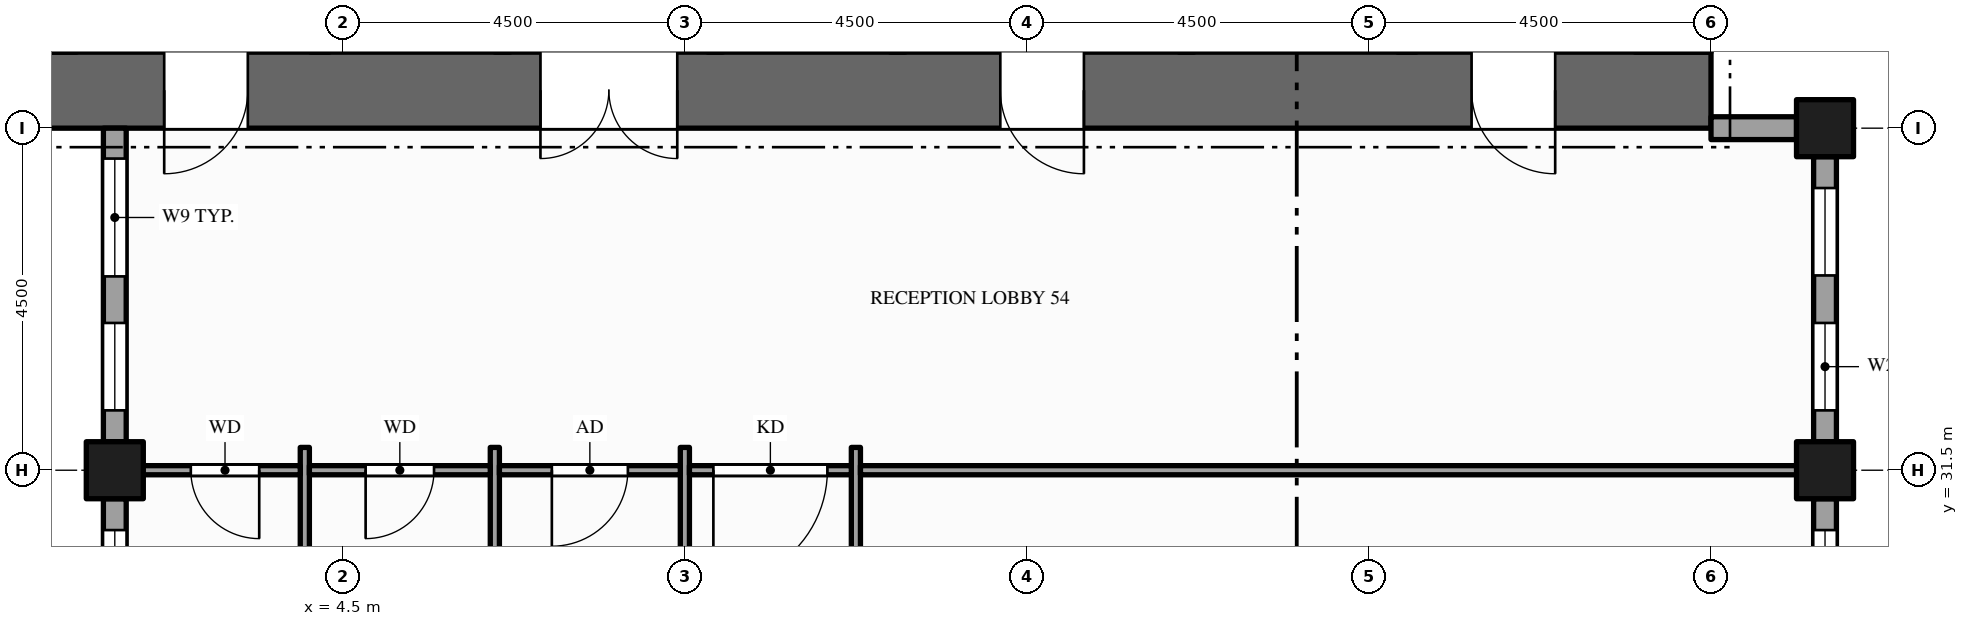
"""IFC4 building model, lengths in metres.
Left out: names, types, materials, properties, quantities, classifications, styles, units other than length and angle.
Written with IfcOpenShell. Run it as: python <this file> out.ifc"""

import sys

from ifc_helpers import new_model, si_unit, direction, frame, frame_2d, origin, origin_2d, place, context, subcontext, project, spatial, rectangle, hollow_rectangle, extrude, element, fill, save


model = new_model("IFC4")
c1 = context("Model", 3, precision=1e-05, world=origin(), true_north=direction((0.0, 1.0)))
c2 = subcontext(c1, "Body", "Model", "MODEL_VIEW")
j1 = project(units=[si_unit("LENGTHUNIT", "METRE"), si_unit("PLANEANGLEUNIT", "RADIAN")], contexts=[c1])
p1 = place(None, origin())
s1 = spatial("IfcSite", under=j1, at=p1, CompositionType="ELEMENT")
p2 = place(p1, origin())
s2 = spatial("IfcBuilding", under=s1, at=p2, CompositionType="ELEMENT")
p3 = place(p2, frame((0.0, 0.0, 223.0)))
s3 = spatial("IfcBuildingStorey", under=s2, at=p3, CompositionType="ELEMENT", Elevation=223.0)
p4 = place(p3, frame((0.0, 36.5, -0.15), z_axis=(0.0, 0.0, 1.0), x_axis=(1.0, 0.0, 0.0)))
e1 = element("IfcWall", 1, at=p4, inside=s3, PredefinedType="SHEAR", context=c2, shape_type="SweptSolid", body=[
    extrude(rectangle(XDim=22.5, YDim=1.0, at=frame_2d((11.25, 0.0))), origin(), (0.0, 0.0, 1.0), 4.0),
])
p5 = place(p4, frame((7.1, 0.0, 0.15)))
e2 = element("IfcOpeningElement", 2, at=p5, cuts=e1, PredefinedType="OPENING", context=c2, shape_type="SweptSolid", body=[
    extrude(rectangle(XDim=1.8, YDim=2.1, at=frame_2d((0.9, 1.05))), frame((0.0, 0.51, 0.0), z_axis=(0.0, -1.0, 0.0), x_axis=(1.0, 0.0, 0.0)), (0.0, 0.0, 1.0), 1.02),
])
p6 = place(p4, frame((13.15, 0.0, 0.15)))
e3 = element("IfcOpeningElement", 3, at=p6, cuts=e1, PredefinedType="OPENING", context=c2, shape_type="SweptSolid", body=[
    extrude(rectangle(XDim=1.1, YDim=2.1, at=frame_2d((0.55, 1.05))), frame((0.0, 0.51, 0.0), z_axis=(0.0, -1.0, 0.0), x_axis=(1.0, 0.0, 0.0)), (0.0, 0.0, 1.0), 1.02),
])
p7 = place(p4, frame((2.15, 0.0, 0.15)))
e4 = element("IfcOpeningElement", 4, at=p7, cuts=e1, PredefinedType="OPENING", context=c2, shape_type="SweptSolid", body=[
    extrude(rectangle(XDim=1.1, YDim=2.1, at=frame_2d((0.55, 1.05))), frame((0.0, 0.51, 0.0), z_axis=(0.0, -1.0, 0.0), x_axis=(1.0, 0.0, 0.0)), (0.0, 0.0, 1.0), 1.02),
])
p8 = place(p4, frame((19.35, 0.0, 0.15)))
e5 = element("IfcOpeningElement", 5, at=p8, cuts=e1, PredefinedType="OPENING", context=c2, shape_type="SweptSolid", body=[
    extrude(rectangle(XDim=1.1, YDim=2.1, at=frame_2d((0.55, 1.05))), frame((0.0, 0.51, 0.0), z_axis=(0.0, -1.0, 0.0), x_axis=(1.0, 0.0, 0.0)), (0.0, 0.0, 1.0), 1.02),
])
for number, where, z_axis, x_axis in (
    (6, (1.5, 31.5, -0.15), (0.0, 0.0, 1.0), (1.0, 0.0, 0.0)),
    (7, (24.0, 31.5, -0.15), (0.0, 0.0, 1.0), (1.0, 0.0, 0.0)),
    (8, (24.0, 36.0, -0.15), (0.0, 0.0, 1.0), (1.0, 0.0, 0.0)),
):
    element("IfcColumn", number, at=place(p3, frame(where, z_axis=z_axis, x_axis=x_axis)), inside=s3, PredefinedType="COLUMN", context=c2, shape_type="SweptSolid", body=[
        extrude(hollow_rectangle(XDim=0.75, YDim=0.75, WallThickness=0.036, at=origin_2d()), origin(), (0.0, 0.0, 1.0), 4.0),
    ])
p9 = place(p3, frame((24.0, 25.875, 0.0), z_axis=(0.0, 0.0, 1.0), x_axis=(0.0, 1.0, 0.0)))
e9 = element("IfcWall", 9, at=p9, inside=s3, PredefinedType="STANDARD", context=c2, shape_type="SweptSolid", body=[
    extrude(rectangle(XDim=5.25, YDim=0.3, at=frame_2d((2.625, 0.0))), origin(), (0.0, 0.0, 1.0), 3.157),
])
p10 = place(p9, frame((1.425, 0.0, 0.9)))
e10 = element("IfcOpeningElement", 10, at=p10, cuts=e9, PredefinedType="OPENING", context=c2, shape_type="SweptSolid", body=[
    extrude(rectangle(XDim=1.65, YDim=2.0, at=frame_2d((0.825, 1.0))), frame((0.0, 0.16, 0.0), z_axis=(0.0, -1.0, 0.0), x_axis=(1.0, 0.0, 0.0)), (0.0, 0.0, 1.0), 0.32),
])
p11 = place(p9, frame((3.688, 0.0, 0.9)))
e11 = element("IfcOpeningElement", 11, at=p11, cuts=e9, PredefinedType="OPENING", context=c2, shape_type="SweptSolid", body=[
    extrude(rectangle(XDim=1.15, YDim=2.0, at=frame_2d((0.575, 1.0))), frame((0.0, 0.16, 0.0), z_axis=(0.0, -1.0, 0.0), x_axis=(1.0, 0.0, 0.0)), (0.0, 0.0, 1.0), 0.32),
])
p12 = place(p3, frame((24.0, 31.875, 0.0), z_axis=(0.0, 0.0, 1.0), x_axis=(0.0, 1.0, 0.0)))
e12 = element("IfcWall", 12, at=p12, inside=s3, PredefinedType="STANDARD", context=c2, shape_type="SweptSolid", body=[
    extrude(rectangle(XDim=3.75, YDim=0.3, at=frame_2d((1.875, 0.0))), origin(), (0.0, 0.0, 1.0), 3.157),
])
p13 = place(p12, frame((0.413, 0.0, 0.9)))
e13 = element("IfcOpeningElement", 13, at=p13, cuts=e12, PredefinedType="OPENING", context=c2, shape_type="SweptSolid", body=[
    extrude(rectangle(XDim=1.15, YDim=2.0, at=frame_2d((0.575, 1.0))), frame((0.0, 0.16, 0.0), z_axis=(0.0, -1.0, 0.0), x_axis=(1.0, 0.0, 0.0)), (0.0, 0.0, 1.0), 0.32),
])
p14 = place(p12, frame((2.188, 0.0, 0.9)))
e14 = element("IfcOpeningElement", 14, at=p14, cuts=e12, PredefinedType="OPENING", context=c2, shape_type="SweptSolid", body=[
    extrude(rectangle(XDim=1.15, YDim=2.0, at=frame_2d((0.575, 1.0))), frame((0.0, 0.16, 0.0), z_axis=(0.0, -1.0, 0.0), x_axis=(1.0, 0.0, 0.0)), (0.0, 0.0, 1.0), 0.32),
])
p15 = place(p3, frame((23.625, 36.0, 0.0), z_axis=(0.0, 0.0, 1.0), x_axis=(-1.0, 0.0, 0.0)))
e15 = element("IfcWall", 15, at=p15, inside=s3, PredefinedType="STANDARD", context=c2, shape_type="SweptSolid", body=[
    extrude(rectangle(XDim=1.125, YDim=0.3, at=frame_2d((0.562, 0.0))), origin(), (0.0, 0.0, 1.0), 2.87),
])
p16 = place(p3, frame((1.5, 36.0, 0.0), z_axis=(0.0, 0.0, 1.0), x_axis=(0.0, -1.0, 0.0)))
e16 = element("IfcWall", 16, at=p16, inside=s3, PredefinedType="STANDARD", context=c2, shape_type="SweptSolid", body=[
    extrude(rectangle(XDim=4.125, YDim=0.3, at=frame_2d((2.062, 0.0))), origin(), (0.0, 0.0, 1.0), 3.157),
])
p17 = place(p16, frame((0.4, 0.0, 0.9)))
e17 = element("IfcOpeningElement", 17, at=p17, cuts=e16, PredefinedType="OPENING", context=c2, shape_type="SweptSolid", body=[
    extrude(rectangle(XDim=1.55, YDim=2.0, at=frame_2d((0.775, 1.0))), frame((0.0, 0.16, 0.0), z_axis=(0.0, -1.0, 0.0), x_axis=(1.0, 0.0, 0.0)), (0.0, 0.0, 1.0), 0.32),
])
p18 = place(p16, frame((2.562, 0.0, 0.9)))
e18 = element("IfcOpeningElement", 18, at=p18, cuts=e16, PredefinedType="OPENING", context=c2, shape_type="SweptSolid", body=[
    extrude(rectangle(XDim=1.15, YDim=2.0, at=frame_2d((0.575, 1.0))), frame((0.0, 0.16, 0.0), z_axis=(0.0, -1.0, 0.0), x_axis=(1.0, 0.0, 0.0)), (0.0, 0.0, 1.0), 0.32),
])
p19 = place(p3, frame((1.5, 31.125, 0.0), z_axis=(0.0, 0.0, 1.0), x_axis=(0.0, -1.0, 0.0)))
e19 = element("IfcWall", 19, at=p19, inside=s3, PredefinedType="STANDARD", context=c2, shape_type="SweptSolid", body=[
    extrude(rectangle(XDim=3.75, YDim=0.3, at=frame_2d((1.875, 0.0))), origin(), (0.0, 0.0, 1.0), 3.157),
])
p20 = place(p19, frame((0.413, 0.0, 0.9)))
e20 = element("IfcOpeningElement", 20, at=p20, cuts=e19, PredefinedType="OPENING", context=c2, shape_type="SweptSolid", body=[
    extrude(rectangle(XDim=1.15, YDim=2.0, at=frame_2d((0.575, 1.0))), frame((0.0, 0.16, 0.0), z_axis=(0.0, -1.0, 0.0), x_axis=(1.0, 0.0, 0.0)), (0.0, 0.0, 1.0), 0.32),
])
p21 = place(p19, frame((2.188, 0.0, 0.9)))
e21 = element("IfcOpeningElement", 21, at=p21, cuts=e19, PredefinedType="OPENING", context=c2, shape_type="SweptSolid", body=[
    extrude(rectangle(XDim=1.15, YDim=2.0, at=frame_2d((0.575, 1.0))), frame((0.0, 0.16, 0.0), z_axis=(0.0, -1.0, 0.0), x_axis=(1.0, 0.0, 0.0)), (0.0, 0.0, 1.0), 0.32),
])
for number, where, z_axis, x_axis in (
    (22, (4.0, 26.7, 0.0), (0.0, 0.0, 1.0), (0.0, 1.0, 0.0)),
    (23, (6.5, 26.7, 0.0), (0.0, 0.0, 1.0), (0.0, 1.0, 0.0)),
):
    element("IfcWall", number, at=place(p3, frame(where, z_axis=z_axis, x_axis=x_axis)), inside=s3, PredefinedType="PARTITIONING", context=c2, shape_type="SweptSolid", body=[
        extrude(rectangle(XDim=5.1, YDim=0.12, at=frame_2d((2.55, 0.0))), origin(), (0.0, 0.0, 1.0), 3.85),
    ])
p22 = place(p3, frame((9.0, 8.7, 0.0), z_axis=(0.0, 0.0, 1.0), x_axis=(0.0, 1.0, 0.0)))
e24 = element("IfcWall", 24, at=p22, inside=s3, PredefinedType="PARTITIONING", context=c2, shape_type="SweptSolid", body=[
    extrude(rectangle(XDim=23.1, YDim=0.12, at=frame_2d((11.55, 0.0))), origin(), (0.0, 0.0, 1.0), 2.6),
])
p23 = place(p22, frame((2.05, 0.0, 0.0)))
e25 = element("IfcOpeningElement", 25, at=p23, cuts=e24, PredefinedType="OPENING", context=c2, shape_type="SweptSolid", body=[
    extrude(rectangle(XDim=1.0, YDim=2.1, at=frame_2d((0.5, 1.05))), frame((0.0, 0.07, 0.0), z_axis=(0.0, -1.0, 0.0), x_axis=(1.0, 0.0, 0.0)), (0.0, 0.0, 1.0), 0.14),
])
p24 = place(p22, frame((7.675, 0.0, 0.0)))
e26 = element("IfcOpeningElement", 26, at=p24, cuts=e24, PredefinedType="OPENING", context=c2, shape_type="SweptSolid", body=[
    extrude(rectangle(XDim=1.0, YDim=2.1, at=frame_2d((0.5, 1.05))), frame((0.0, 0.07, 0.0), z_axis=(0.0, -1.0, 0.0), x_axis=(1.0, 0.0, 0.0)), (0.0, 0.0, 1.0), 0.14),
])
p25 = place(p22, frame((14.455, 0.0, 0.0)))
e27 = element("IfcOpeningElement", 27, at=p25, cuts=e24, PredefinedType="OPENING", context=c2, shape_type="SweptSolid", body=[
    extrude(rectangle(XDim=1.0, YDim=2.1, at=frame_2d((0.5, 1.05))), frame((0.0, 0.07, 0.0), z_axis=(0.0, -1.0, 0.0), x_axis=(1.0, 0.0, 0.0)), (0.0, 0.0, 1.0), 0.14),
])
p26 = place(p3, frame((11.25, 8.7, 0.0), z_axis=(0.0, 0.0, 1.0), x_axis=(0.0, 1.0, 0.0)))
e28 = element("IfcWall", 28, at=p26, inside=s3, PredefinedType="PARTITIONING", context=c2, shape_type="SweptSolid", body=[
    extrude(rectangle(XDim=23.1, YDim=0.12, at=frame_2d((11.55, 0.0))), origin(), (0.0, 0.0, 1.0), 2.6),
])
p27 = place(p26, frame((18.825, 0.0, 0.0)))
e29 = element("IfcOpeningElement", 29, at=p27, cuts=e28, PredefinedType="OPENING", context=c2, shape_type="SweptSolid", body=[
    extrude(rectangle(XDim=1.2, YDim=2.1, at=frame_2d((0.6, 1.05))), frame((0.0, 0.07, 0.0), z_axis=(0.0, -1.0, 0.0), x_axis=(1.0, 0.0, 0.0)), (0.0, 0.0, 1.0), 0.14),
])
p28 = place(p26, frame((4.2, 0.0, 0.0)))
e30 = element("IfcOpeningElement", 30, at=p28, cuts=e28, PredefinedType="OPENING", context=c2, shape_type="SweptSolid", body=[
    extrude(rectangle(XDim=1.2, YDim=2.1, at=frame_2d((0.6, 1.05))), frame((0.0, 0.07, 0.0), z_axis=(0.0, -1.0, 0.0), x_axis=(1.0, 0.0, 0.0)), (0.0, 0.0, 1.0), 0.14),
])
p29 = place(p3, frame((1.65, 31.5, 0.0), z_axis=(0.0, 0.0, 1.0), x_axis=(1.0, 0.0, 0.0)))
e31 = element("IfcWall", 31, at=p29, inside=s3, PredefinedType="PARTITIONING", context=c2, shape_type="SweptSolid", body=[
    extrude(rectangle(XDim=2.29, YDim=0.12, at=frame_2d((1.145, 0.0))), origin(), (0.0, 0.0, 1.0), 2.87),
])
p30 = place(p29, frame((0.85, 0.0, 0.0)))
e32 = element("IfcOpeningElement", 32, at=p30, cuts=e31, PredefinedType="OPENING", context=c2, shape_type="SweptSolid", body=[
    extrude(rectangle(XDim=0.9, YDim=2.1, at=frame_2d((0.45, 1.05))), frame((0.0, 0.07, 0.0), z_axis=(0.0, -1.0, 0.0), x_axis=(1.0, 0.0, 0.0)), (0.0, 0.0, 1.0), 0.14),
])
p31 = place(p3, frame((4.06, 31.5, 0.0), z_axis=(0.0, 0.0, 1.0), x_axis=(1.0, 0.0, 0.0)))
e33 = element("IfcWall", 33, at=p31, inside=s3, PredefinedType="PARTITIONING", context=c2, shape_type="SweptSolid", body=[
    extrude(rectangle(XDim=2.38, YDim=0.12, at=frame_2d((1.19, 0.0))), origin(), (0.0, 0.0, 1.0), 2.87),
])
p32 = place(p31, frame((0.74, 0.0, 0.0)))
e34 = element("IfcOpeningElement", 34, at=p32, cuts=e33, PredefinedType="OPENING", context=c2, shape_type="SweptSolid", body=[
    extrude(rectangle(XDim=0.9, YDim=2.1, at=frame_2d((0.45, 1.05))), frame((0.0, 0.07, 0.0), z_axis=(0.0, -1.0, 0.0), x_axis=(1.0, 0.0, 0.0)), (0.0, 0.0, 1.0), 0.14),
])
p33 = place(p3, frame((6.56, 31.5, 0.0), z_axis=(0.0, 0.0, 1.0), x_axis=(1.0, 0.0, 0.0)))
e35 = element("IfcWall", 35, at=p33, inside=s3, PredefinedType="PARTITIONING", context=c2, shape_type="SweptSolid", body=[
    extrude(rectangle(XDim=2.38, YDim=0.12, at=frame_2d((1.19, 0.0))), origin(), (0.0, 0.0, 1.0), 2.87),
])
p34 = place(p33, frame((0.69, 0.0, 0.0)))
e36 = element("IfcOpeningElement", 36, at=p34, cuts=e35, PredefinedType="OPENING", context=c2, shape_type="SweptSolid", body=[
    extrude(rectangle(XDim=1.0, YDim=2.1, at=frame_2d((0.5, 1.05))), frame((0.0, 0.07, 0.0), z_axis=(0.0, -1.0, 0.0), x_axis=(1.0, 0.0, 0.0)), (0.0, 0.0, 1.0), 0.14),
])
p35 = place(p3, frame((9.06, 31.5, 0.0), z_axis=(0.0, 0.0, 1.0), x_axis=(1.0, 0.0, 0.0)))
e37 = element("IfcWall", 37, at=p35, inside=s3, PredefinedType="PARTITIONING", context=c2, shape_type="SweptSolid", body=[
    extrude(rectangle(XDim=2.13, YDim=0.12, at=frame_2d((1.065, 0.0))), origin(), (0.0, 0.0, 1.0), 2.87),
])
p36 = place(p35, frame((0.315, 0.0, 0.0)))
e38 = element("IfcOpeningElement", 38, at=p36, cuts=e37, PredefinedType="OPENING", context=c2, shape_type="SweptSolid", body=[
    extrude(rectangle(XDim=1.5, YDim=2.1, at=frame_2d((0.75, 1.05))), frame((0.0, 0.07, 0.0), z_axis=(0.0, -1.0, 0.0), x_axis=(1.0, 0.0, 0.0)), (0.0, 0.0, 1.0), 0.14),
])
p37 = place(p3, frame((11.31, 31.5, 0.0), z_axis=(0.0, 0.0, 1.0), x_axis=(1.0, 0.0, 0.0)))
e39 = element("IfcWall", 39, at=p37, inside=s3, PredefinedType="PARTITIONING", context=c2, shape_type="SweptSolid", body=[
    extrude(rectangle(XDim=12.54, YDim=0.12, at=frame_2d((6.27, 0.0))), origin(), (0.0, 0.0, 1.0), 2.87),
])
p38 = place(p11, origin())
e40 = element("IfcWindow", 40, at=p38, inside=s3, PartitioningType="SINGLE_PANEL", PredefinedType="WINDOW", context=c2, shape_type="SweptSolid", body=[
    extrude(rectangle(XDim=1.15, YDim=2.0, at=frame_2d((0.575, 1.0))), frame((0.0, 0.03, 0.0), z_axis=(0.0, -1.0, 0.0), x_axis=(1.0, 0.0, 0.0)), (0.0, 0.0, 1.0), 0.06),
])
fill(e11, e40)
p39 = place(p13, origin())
e41 = element("IfcWindow", 41, at=p39, inside=s3, PartitioningType="SINGLE_PANEL", PredefinedType="WINDOW", context=c2, shape_type="SweptSolid", body=[
    extrude(rectangle(XDim=1.15, YDim=2.0, at=frame_2d((0.575, 1.0))), frame((0.0, 0.03, 0.0), z_axis=(0.0, -1.0, 0.0), x_axis=(1.0, 0.0, 0.0)), (0.0, 0.0, 1.0), 0.06),
])
fill(e13, e41)
p40 = place(p14, origin())
e42 = element("IfcWindow", 42, at=p40, inside=s3, PartitioningType="SINGLE_PANEL", PredefinedType="WINDOW", context=c2, shape_type="SweptSolid", body=[
    extrude(rectangle(XDim=1.15, YDim=2.0, at=frame_2d((0.575, 1.0))), frame((0.0, 0.03, 0.0), z_axis=(0.0, -1.0, 0.0), x_axis=(1.0, 0.0, 0.0)), (0.0, 0.0, 1.0), 0.06),
])
fill(e14, e42)
p41 = place(p17, origin())
e43 = element("IfcWindow", 43, at=p41, inside=s3, PartitioningType="SINGLE_PANEL", PredefinedType="WINDOW", context=c2, shape_type="SweptSolid", body=[
    extrude(rectangle(XDim=1.55, YDim=2.0, at=frame_2d((0.775, 1.0))), frame((0.0, 0.03, 0.0), z_axis=(0.0, -1.0, 0.0), x_axis=(1.0, 0.0, 0.0)), (0.0, 0.0, 1.0), 0.06),
])
fill(e17, e43)
p42 = place(p18, origin())
e44 = element("IfcWindow", 44, at=p42, inside=s3, PartitioningType="SINGLE_PANEL", PredefinedType="WINDOW", context=c2, shape_type="SweptSolid", body=[
    extrude(rectangle(XDim=1.15, YDim=2.0, at=frame_2d((0.575, 1.0))), frame((0.0, 0.03, 0.0), z_axis=(0.0, -1.0, 0.0), x_axis=(1.0, 0.0, 0.0)), (0.0, 0.0, 1.0), 0.06),
])
fill(e18, e44)
p43 = place(p20, origin())
e45 = element("IfcWindow", 45, at=p43, inside=s3, PartitioningType="SINGLE_PANEL", PredefinedType="WINDOW", context=c2, shape_type="SweptSolid", body=[
    extrude(rectangle(XDim=1.15, YDim=2.0, at=frame_2d((0.575, 1.0))), frame((0.0, 0.03, 0.0), z_axis=(0.0, -1.0, 0.0), x_axis=(1.0, 0.0, 0.0)), (0.0, 0.0, 1.0), 0.06),
])
fill(e20, e45)
p44 = place(p5, origin())
e46 = element("IfcDoor", 46, at=p44, inside=s3, OperationType="DOUBLE_DOOR_SINGLE_SWING", PredefinedType="DOOR", context=c2, shape_type="SweptSolid", body=[
    extrude(rectangle(XDim=1.8, YDim=2.1, at=frame_2d((0.9, 1.05))), frame((0.0, 0.025, 0.0), z_axis=(0.0, -1.0, 0.0), x_axis=(1.0, 0.0, 0.0)), (0.0, 0.0, 1.0), 0.05),
])
fill(e2, e46)
p45 = place(p6, origin())
e47 = element("IfcDoor", 47, at=p45, inside=s3, OperationType="SINGLE_SWING_RIGHT", PredefinedType="DOOR", context=c2, shape_type="SweptSolid", body=[
    extrude(rectangle(XDim=1.1, YDim=2.1, at=frame_2d((0.55, 1.05))), frame((0.0, 0.025, 0.0), z_axis=(0.0, -1.0, 0.0), x_axis=(1.0, 0.0, 0.0)), (0.0, 0.0, 1.0), 0.05),
])
fill(e3, e47)
p46 = place(p7, origin())
e48 = element("IfcDoor", 48, at=p46, inside=s3, OperationType="SINGLE_SWING_LEFT", PredefinedType="DOOR", context=c2, shape_type="SweptSolid", body=[
    extrude(rectangle(XDim=1.1, YDim=2.1, at=frame_2d((0.55, 1.05))), frame((0.0, 0.025, 0.0), z_axis=(0.0, -1.0, 0.0), x_axis=(1.0, 0.0, 0.0)), (0.0, 0.0, 1.0), 0.05),
])
fill(e4, e48)
p47 = place(p8, origin())
e49 = element("IfcDoor", 49, at=p47, inside=s3, OperationType="SINGLE_SWING_RIGHT", PredefinedType="DOOR", context=c2, shape_type="SweptSolid", body=[
    extrude(rectangle(XDim=1.1, YDim=2.1, at=frame_2d((0.55, 1.05))), frame((0.0, 0.025, 0.0), z_axis=(0.0, -1.0, 0.0), x_axis=(1.0, 0.0, 0.0)), (0.0, 0.0, 1.0), 0.05),
])
fill(e5, e49)
p48 = place(p36, origin())
e50 = element("IfcDoor", 50, at=p48, inside=s3, OperationType="SINGLE_SWING_LEFT", PredefinedType="DOOR", context=c2, shape_type="SweptSolid", body=[
    extrude(rectangle(XDim=1.5, YDim=2.1, at=frame_2d((0.75, 1.05))), frame((0.0, 0.025, 0.0), z_axis=(0.0, -1.0, 0.0), x_axis=(1.0, 0.0, 0.0)), (0.0, 0.0, 1.0), 0.05),
])
fill(e38, e50)
p49 = place(p30, origin())
e51 = element("IfcDoor", 51, at=p49, inside=s3, OperationType="SINGLE_SWING_RIGHT", PredefinedType="DOOR", context=c2, shape_type="SweptSolid", body=[
    extrude(rectangle(XDim=0.9, YDim=2.1, at=frame_2d((0.45, 1.05))), frame((0.0, 0.025, 0.0), z_axis=(0.0, -1.0, 0.0), x_axis=(1.0, 0.0, 0.0)), (0.0, 0.0, 1.0), 0.05),
])
fill(e32, e51)
p50 = place(p32, origin())
e52 = element("IfcDoor", 52, at=p50, inside=s3, OperationType="SINGLE_SWING_LEFT", PredefinedType="DOOR", context=c2, shape_type="SweptSolid", body=[
    extrude(rectangle(XDim=0.9, YDim=2.1, at=frame_2d((0.45, 1.05))), frame((0.0, 0.025, 0.0), z_axis=(0.0, -1.0, 0.0), x_axis=(1.0, 0.0, 0.0)), (0.0, 0.0, 1.0), 0.05),
])
fill(e34, e52)
p51 = place(p34, origin())
e53 = element("IfcDoor", 53, at=p51, inside=s3, OperationType="SINGLE_SWING_LEFT", PredefinedType="DOOR", context=c2, shape_type="SweptSolid", body=[
    extrude(rectangle(XDim=1.0, YDim=2.1, at=frame_2d((0.5, 1.05))), frame((0.0, 0.025, 0.0), z_axis=(0.0, -1.0, 0.0), x_axis=(1.0, 0.0, 0.0)), (0.0, 0.0, 1.0), 0.05),
])
fill(e36, e53)
save(model, sys.argv[1])
